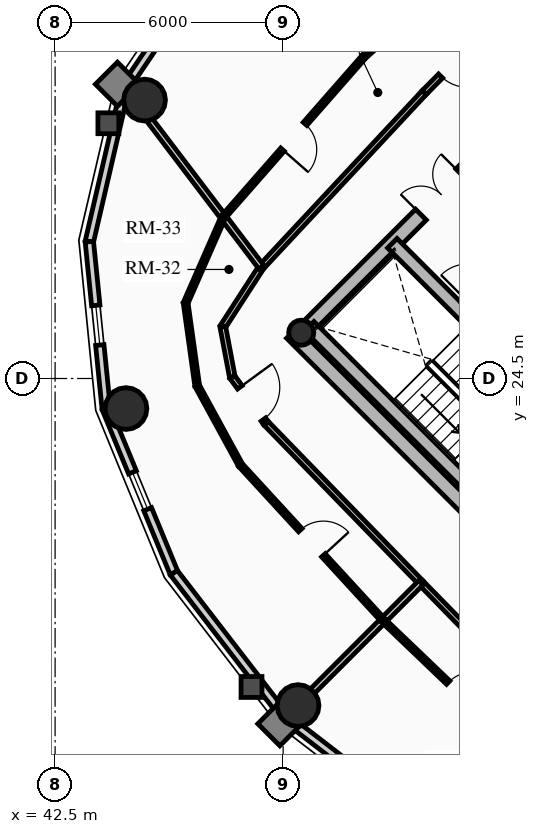
"""IFC4 building model, lengths in metres.
Left out: names, types, materials, properties, quantities, classifications, styles, units other than length and angle.
Written with IfcOpenShell. Run it as: python <this file> out.ifc"""

import sys

from ifc_helpers import new_model, si_unit, direction, frame, frame_2d, origin, origin_2d, place, context, subcontext, project, spatial, rectangle, circle, hollow_circle, extrude, source, transform, mapped, element, fill, save


model = new_model("IFC4")
c1 = context("Model", 3, precision=1e-05, world=origin(), true_north=direction((0.0, 1.0)))
c2 = subcontext(c1, "Body", "Model", "MODEL_VIEW")
j1 = project(units=[si_unit("LENGTHUNIT", "METRE"), si_unit("PLANEANGLEUNIT", "RADIAN")], contexts=[c1])
p1 = place(None, origin())
s1 = spatial("IfcSite", under=j1, at=p1, CompositionType="ELEMENT")
p2 = place(p1, origin())
s2 = spatial("IfcBuilding", under=s1, at=p2, CompositionType="ELEMENT")
p3 = place(p2, frame((0.0, 0.0, 226.05)))
s3 = spatial("IfcBuildingStorey", under=s2, at=p3, CompositionType="ELEMENT", Elevation=226.05)
p4 = place(p3, frame((58.702, 15.732, 0.0), z_axis=(0.0, 0.0, 1.0), x_axis=(-0.707106781187, 0.707106781187, 0.0)))
e1 = element("IfcWall", 1, at=p4, inside=s3, PredefinedType="SHEAR", context=c2, shape_type="SweptSolid", body=[
    extrude(rectangle(XDim=14.1, YDim=0.4, at=frame_2d((7.05, 0.0))), origin(), (0.0, 0.0, 1.0), 3.2),
])
p5 = place(p3, frame((48.873, 25.561, 0.0), z_axis=(0.0, 0.0, 1.0), x_axis=(0.707106781187, 0.707106781187, 0.0)))
e2 = element("IfcWall", 2, at=p5, inside=s3, PredefinedType="SHEAR", context=c2, shape_type="SweptSolid", body=[
    extrude(rectangle(XDim=10.7, YDim=0.4, at=frame_2d((5.35, 0.0))), origin(), (0.0, 0.0, 1.0), 3.2),
])
m1 = source(origin(), c2, "Body", "SweptSolid", [
    extrude(rectangle(XDim=1.5, YDim=2.02, at=frame_2d((0.75, 1.01))), frame((0.0, 0.21, 0.0), z_axis=(0.0, -1.0, 0.0), x_axis=(1.0, 0.0, 0.0)), (0.0, 0.0, 1.0), 0.42),
])
p6 = place(p5, frame((4.6, 0.0, 0.0)))
e3 = element("IfcOpeningElement", 3, at=p6, cuts=e2, PredefinedType="OPENING", context=c2, shape_type="MappedRepresentation", body=[
    mapped(m1, transform((0.0, 0.0, 0.0), x_axis=(1.0, 0.0, 0.0), y_axis=(0.0, 1.0, 0.0), z_axis=(0.0, 0.0, 1.0), scale=1.0)),
])
p7 = place(p3, frame((61.06, 18.373, 0.0), z_axis=(0.0, 0.0, 1.0), x_axis=(-0.707106781187, 0.707106781187, 0.0)))
e4 = element("IfcWall", 4, at=p7, inside=s3, PredefinedType="SHEAR", context=c2, shape_type="SweptSolid", body=[
    extrude(rectangle(XDim=13.7, YDim=0.35, at=frame_2d((6.85, 0.0))), origin(), (0.0, 0.0, 1.0), 3.2),
])
m2 = source(origin(), c2, "Body", "SweptSolid", [
    extrude(rectangle(XDim=1.1, YDim=2.015, at=frame_2d((0.55, 1.007))), frame((0.0, 0.185, 0.0), z_axis=(0.0, -1.0, 0.0), x_axis=(1.0, 0.0, 0.0)), (0.0, 0.0, 1.0), 0.37),
])
p8 = place(p7, frame((4.85, 0.0, 0.0)))
e5 = element("IfcOpeningElement", 5, at=p8, cuts=e4, PredefinedType="OPENING", context=c2, shape_type="MappedRepresentation", body=[
    mapped(m2, transform((0.0, 0.0, 0.0), x_axis=(1.0, 0.0, 0.0), y_axis=(0.0, 1.0, 0.0), z_axis=(0.0, 0.0, 1.0), scale=1.0)),
])
p9 = place(p7, frame((0.625, 0.0, 0.0)))
e6 = element("IfcOpeningElement", 6, at=p9, cuts=e4, PredefinedType="OPENING", context=c2, shape_type="MappedRepresentation", body=[
    mapped(m2, transform((0.0, 0.0, 0.0), x_axis=(1.0, 0.0, 0.0), y_axis=(0.0, 1.0, 0.0), z_axis=(0.0, 0.0, 1.0), scale=1.0)),
])
p10 = place(p7, frame((2.625, 0.0, 0.0)))
e7 = element("IfcOpeningElement", 7, at=p10, cuts=e4, PredefinedType="OPENING", context=c2, shape_type="MappedRepresentation", body=[
    mapped(m2, transform((0.0, 0.0, 0.0), x_axis=(1.0, 0.0, 0.0), y_axis=(0.0, 1.0, 0.0), z_axis=(0.0, 0.0, 1.0), scale=1.0)),
])
m3 = source(origin(), c2, "Body", "SweptSolid", [
    extrude(rectangle(XDim=1.15, YDim=2.02, at=frame_2d((0.575, 1.01))), frame((0.0, 0.185, 0.0), z_axis=(0.0, -1.0, 0.0), x_axis=(1.0, 0.0, 0.0)), (0.0, 0.0, 1.0), 0.37),
])
p11 = place(p7, frame((7.27, 0.0, 0.0)))
e8 = element("IfcOpeningElement", 8, at=p11, cuts=e4, PredefinedType="OPENING", context=c2, shape_type="MappedRepresentation", body=[
    mapped(m3, transform((0.0, 0.0, 0.0), x_axis=(1.0, 0.0, 0.0), y_axis=(0.0, 1.0, 0.0), z_axis=(0.0, 0.0, 1.0), scale=1.0)),
])
p12 = place(p3, frame((53.922, 21.141, 0.0), z_axis=(0.0, 0.0, 1.0), x_axis=(-0.707106781187, 0.707106781187, 0.0)))
e9 = element("IfcWall", 9, at=p12, inside=s3, PredefinedType="SHEAR", context=c2, shape_type="SweptSolid", body=[
    extrude(rectangle(XDim=6.695, YDim=0.35, at=frame_2d((3.348, 0.0))), origin(), (0.0, 0.0, 1.0), 3.2),
])
p13 = place(p3, frame((48.976, 25.706, 0.0), z_axis=(0.0, 0.0, 1.0), x_axis=(0.707106781187, 0.707106781187, 0.0)))
e10 = element("IfcColumn", 10, at=p13, inside=s3, PredefinedType="COLUMN", context=c2, shape_type="SweptSolid", body=[
    extrude(hollow_circle(Radius=0.33, WallThickness=0.025, at=origin_2d()), origin(), (0.0, 0.0, 1.0), 3.2),
])
for number, where, z_axis, x_axis in (
    (11, (44.854, 31.827, 0.0), (0.0, 0.0, 1.0), (1.0, 0.0, 0.0)),
    (12, (44.365, 23.709, 0.0), (0.0, 0.0, 1.0), (1.0, 0.0, 0.0)),
    (13, (48.893, 15.893, 0.0), (0.0, 0.0, 1.0), (1.0, 0.0, 0.0)),
):
    element("IfcColumn", number, at=place(p3, frame(where, z_axis=z_axis, x_axis=x_axis)), inside=s3, PredefinedType="USERDEFINED", context=c2, shape_type="SweptSolid", body=[
        extrude(circle(Radius=0.55, at=origin_2d()), origin(), (0.0, 0.0, 1.0), 3.2),
    ])
p14 = place(p3, frame((44.337, 32.144, 0.0), z_axis=(0.0, 0.0, 1.0), x_axis=(0.559495003079, 0.828833723692, 0.0)))
e14 = element("IfcWall", 14, at=p14, inside=s3, PredefinedType="SOLIDWALL", context=c2, shape_type="SweptSolid", body=[
    extrude(rectangle(XDim=3.976, YDim=0.22, at=frame_2d((1.988, 0.0))), origin(), (0.0, 0.0, 1.0), 2.612),
])
m4 = source(origin(), c2, "Body", "SweptSolid", [
    extrude(rectangle(XDim=1.05, YDim=1.3, at=frame_2d((0.525, 0.65))), frame((0.0, 0.12, 0.0), z_axis=(0.0, -1.0, 0.0), x_axis=(1.0, 0.0, 0.0)), (0.0, 0.0, 1.0), 0.24),
])
p15 = place(p14, frame((1.463, 0.0, 0.65)))
e15 = element("IfcOpeningElement", 15, at=p15, cuts=e14, PredefinedType="OPENING", context=c2, shape_type="MappedRepresentation", body=[
    mapped(m4, transform((0.0, 0.0, 0.0), x_axis=(1.0, 0.0, 0.0), y_axis=(0.0, 1.0, 0.0), z_axis=(0.0, 0.0, 1.0), scale=1.0)),
])
p16 = place(p3, frame((43.401, 28.1, 0.0), z_axis=(0.0, 0.0, 1.0), x_axis=(0.225473813158, 0.974249228678, 0.0)))
e16 = element("IfcWall", 16, at=p16, inside=s3, PredefinedType="SOLIDWALL", context=c2, shape_type="SweptSolid", body=[
    extrude(rectangle(XDim=4.15, YDim=0.22, at=frame_2d((2.075, 0.0))), origin(), (0.0, 0.0, 1.0), 2.612),
])
p17 = place(p3, frame((43.845, 23.705, 0.0), z_axis=(0.0, 0.0, 1.0), x_axis=(-0.100570534541, 0.994929930991, 0.0)))
e17 = element("IfcWall", 17, at=p17, inside=s3, PredefinedType="SOLIDWALL", context=c2, shape_type="SweptSolid", body=[
    extrude(rectangle(XDim=4.418, YDim=0.22, at=frame_2d((2.209, 0.0))), origin(), (0.0, 0.0, 1.0), 2.612),
])
p18 = place(p17, frame((1.684, 0.0, 0.65)))
e18 = element("IfcOpeningElement", 18, at=p18, cuts=e17, PredefinedType="OPENING", context=c2, shape_type="MappedRepresentation", body=[
    mapped(m4, transform((0.0, 0.0, 0.0), x_axis=(1.0, 0.0, 0.0), y_axis=(0.0, 1.0, 0.0), z_axis=(0.0, 0.0, 1.0), scale=1.0)),
])
p19 = place(p3, frame((45.626, 19.387, 0.0), z_axis=(0.0, 0.0, 1.0), x_axis=(-0.381309704956, 0.924447353237, 0.0)))
e19 = element("IfcWall", 19, at=p19, inside=s3, PredefinedType="SOLIDWALL", context=c2, shape_type="SweptSolid", body=[
    extrude(rectangle(XDim=4.671, YDim=0.22, at=frame_2d((2.335, 0.0))), origin(), (0.0, 0.0, 1.0), 2.612),
])
p20 = place(p19, frame((1.81, 0.0, 0.65)))
e20 = element("IfcOpeningElement", 20, at=p20, cuts=e19, PredefinedType="OPENING", context=c2, shape_type="MappedRepresentation", body=[
    mapped(m4, transform((0.0, 0.0, 0.0), x_axis=(1.0, 0.0, 0.0), y_axis=(0.0, 1.0, 0.0), z_axis=(0.0, 0.0, 1.0), scale=1.0)),
])
p21 = place(p3, frame((48.569, 15.569, 0.0), z_axis=(0.0, 0.0, 1.0), x_axis=(-0.610523083886, 0.791998462147, 0.0)))
e21 = element("IfcWall", 21, at=p21, inside=s3, PredefinedType="SOLIDWALL", context=c2, shape_type="SweptSolid", body=[
    extrude(rectangle(XDim=4.82, YDim=0.22, at=frame_2d((2.41, 0.0))), origin(), (0.0, 0.0, 1.0), 2.612),
])
p22 = place(p3, frame((52.387, 12.626, 0.0), z_axis=(0.0, 0.0, 1.0), x_axis=(-0.791998462147, 0.610523083886, 0.0)))
e22 = element("IfcWall", 22, at=p22, inside=s3, PredefinedType="SOLIDWALL", context=c2, shape_type="SweptSolid", body=[
    extrude(rectangle(XDim=4.82, YDim=0.22, at=frame_2d((2.41, 0.0))), origin(), (0.0, 0.0, 1.0), 2.612),
])
p23 = place(p22, frame((1.885, 0.0, 0.65)))
e23 = element("IfcOpeningElement", 23, at=p23, cuts=e22, PredefinedType="OPENING", context=c2, shape_type="MappedRepresentation", body=[
    mapped(m4, transform((0.0, 0.0, 0.0), x_axis=(1.0, 0.0, 0.0), y_axis=(0.0, 1.0, 0.0), z_axis=(0.0, 0.0, 1.0), scale=1.0)),
])
p24 = place(p3, frame((54.506, 34.344, 0.0), z_axis=(0.0, 0.0, 1.0), x_axis=(-0.703053402247, -0.711137056824, 0.0)))
e24 = element("IfcWall", 24, at=p24, inside=s3, PredefinedType="PARTITIONING", context=c2, shape_type="SweptSolid", body=[
    extrude(rectangle(XDim=3.262, YDim=0.15, at=frame_2d((1.631, 0.0))), origin(), (0.0, 0.0, 1.0), 2.612),
])
m5 = source(origin(), c2, "Body", "SweptSolid", [
    extrude(rectangle(XDim=1.05, YDim=2.015, at=frame_2d((0.525, 1.007))), frame((0.0, 0.085, 0.0), z_axis=(0.0, -1.0, 0.0), x_axis=(1.0, 0.0, 0.0)), (0.0, 0.0, 1.0), 0.17),
])
p25 = place(p24, frame((1.599, 0.0, 0.0)))
e25 = element("IfcOpeningElement", 25, at=p25, cuts=e24, PredefinedType="OPENING", context=c2, shape_type="MappedRepresentation", body=[
    mapped(m5, transform((0.0, 0.0, 0.0), x_axis=(1.0, 0.0, 0.0), y_axis=(0.0, 1.0, 0.0), z_axis=(0.0, 0.0, 1.0), scale=1.0)),
])
p26 = place(p3, frame((52.212, 32.024, 0.0), z_axis=(0.0, 0.0, 1.0), x_axis=(-0.682158998173, -0.731203871169, 0.0)))
e26 = element("IfcWall", 26, at=p26, inside=s3, PredefinedType="PARTITIONING", context=c2, shape_type="SweptSolid", body=[
    extrude(rectangle(XDim=6.282, YDim=0.15, at=frame_2d((3.141, 0.0))), origin(), (0.0, 0.0, 1.0), 2.545),
])
p27 = place(p3, frame((47.927, 27.431, 0.0), z_axis=(0.0, 0.0, 1.0), x_axis=(-0.543126643356, -0.839650790077, 0.0)))
e27 = element("IfcWall", 27, at=p27, inside=s3, PredefinedType="PARTITIONING", context=c2, shape_type="SweptSolid", body=[
    extrude(rectangle(XDim=1.868, YDim=0.15, at=frame_2d((0.934, 0.0))), origin(), (0.0, 0.0, 1.0), 2.545),
])
p28 = place(p3, frame((46.912, 25.862, 0.0), z_axis=(0.0, 0.0, 1.0), x_axis=(0.186095172215, -0.98253172309, 0.0)))
e28 = element("IfcWall", 28, at=p28, inside=s3, PredefinedType="PARTITIONING", context=c2, shape_type="SweptSolid", body=[
    extrude(rectangle(XDim=1.346, YDim=0.15, at=frame_2d((0.673, 0.0))), origin(), (0.0, 0.0, 1.0), 2.612),
])
p29 = place(p3, frame((47.163, 24.54, 0.0), z_axis=(0.0, 0.0, 1.0), x_axis=(0.589711902124, -0.807613690135, 0.0)))
e29 = element("IfcWall", 29, at=p29, inside=s3, PredefinedType="PARTITIONING", context=c2, shape_type="SweptSolid", body=[
    extrude(rectangle(XDim=1.507, YDim=0.15, at=frame_2d((0.753, 0.0))), origin(), (0.0, 0.0, 1.0), 2.545),
])
p30 = place(p29, frame((0.337, 0.0, 0.0)))
e30 = element("IfcOpeningElement", 30, at=p30, cuts=e29, PredefinedType="OPENING", context=c2, shape_type="MappedRepresentation", body=[
    mapped(m5, transform((0.0, 0.0, 0.0), x_axis=(1.0, 0.0, 0.0), y_axis=(0.0, 1.0, 0.0), z_axis=(0.0, 0.0, 1.0), scale=1.0)),
])
p31 = place(p3, frame((48.052, 23.323, 0.0), z_axis=(0.0, 0.0, 1.0), x_axis=(0.696573981306, -0.717484974454, 0.0)))
e31 = element("IfcWall", 31, at=p31, inside=s3, PredefinedType="PARTITIONING", context=c2, shape_type="SweptSolid", body=[
    extrude(rectangle(XDim=5.849, YDim=0.15, at=frame_2d((2.925, 0.0))), origin(), (0.0, 0.0, 1.0), 2.975),
])
p32 = place(p3, frame((52.126, 19.126, 0.0), z_axis=(0.0, 0.0, 1.0), x_axis=(0.698979087027, -0.715142108884, 0.0)))
e32 = element("IfcWall", 32, at=p32, inside=s3, PredefinedType="PARTITIONING", context=c2, shape_type="SweptSolid", body=[
    extrude(rectangle(XDim=5.966, YDim=0.15, at=frame_2d((2.983, 0.0))), origin(), (0.0, 0.0, 1.0), 2.612),
])
p33 = place(p3, frame((47.927, 27.431, 0.0), z_axis=(0.0, 0.0, 1.0), x_axis=(-0.604823333103, 0.796359677366, 0.0)))
e33 = element("IfcWall", 33, at=p33, inside=s3, PredefinedType="PARTITIONING", context=c2, shape_type="SweptSolid", body=[
    extrude(rectangle(XDim=5.907, YDim=0.16, at=frame_2d((2.953, 0.0))), origin(), (0.0, 0.0, 1.0), 2.612),
])
p34 = place(p3, frame((52.126, 19.126, 0.0), z_axis=(0.0, 0.0, 1.0), x_axis=(-0.707106781187, -0.707106781187, 0.0)))
e34 = element("IfcWall", 34, at=p34, inside=s3, PredefinedType="PARTITIONING", context=c2, shape_type="SweptSolid", body=[
    extrude(rectangle(XDim=5.01, YDim=0.16, at=frame_2d((2.505, 0.0))), origin(), (0.0, 0.0, 1.0), 2.612),
])
p35 = place(p3, frame((53.206, 35.268, 0.0), z_axis=(0.0, 0.0, 1.0), x_axis=(-0.746677760999, -0.665185929819, 0.0)))
e35 = element("IfcWall", 35, at=p35, inside=s3, PredefinedType="PARTITIONING", context=c2, shape_type="SweptSolid", body=[
    extrude(rectangle(XDim=3.445, YDim=0.125, at=frame_2d((1.723, 0.0))), origin(), (0.0, 0.0, 1.0), 2.612),
])
p36 = place(p3, frame((50.634, 32.977, 0.0), z_axis=(0.0, 0.0, 1.0), x_axis=(-0.659241945747, -0.751930885765, 0.0)))
e36 = element("IfcWall", 36, at=p36, inside=s3, PredefinedType="PARTITIONING", context=c2, shape_type="SweptSolid", body=[
    extrude(rectangle(XDim=5.624, YDim=0.125, at=frame_2d((2.812, 0.0))), origin(), (0.0, 0.0, 1.0), 2.545),
])
m6 = source(origin(), c2, "Body", "SweptSolid", [
    extrude(rectangle(XDim=0.9, YDim=2.005, at=frame_2d((0.45, 1.002))), frame((0.0, 0.073, 0.0), z_axis=(0.0, -1.0, 0.0), x_axis=(1.0, 0.0, 0.0)), (0.0, 0.0, 1.0), 0.145),
])
p37 = place(p36, frame((2.362, 0.0, 0.0)))
e37 = element("IfcOpeningElement", 37, at=p37, cuts=e36, PredefinedType="OPENING", context=c2, shape_type="MappedRepresentation", body=[
    mapped(m6, transform((0.0, 0.0, 0.0), x_axis=(1.0, 0.0, 0.0), y_axis=(0.0, 1.0, 0.0), z_axis=(0.0, 0.0, 1.0), scale=1.0)),
])
p38 = place(p3, frame((46.927, 28.748, 0.0), z_axis=(0.0, 0.0, 1.0), x_axis=(-0.401820136661, -0.91571861277, 0.0)))
e38 = element("IfcWall", 38, at=p38, inside=s3, PredefinedType="PARTITIONING", context=c2, shape_type="SweptSolid", body=[
    extrude(rectangle(XDim=2.468, YDim=0.125, at=frame_2d((1.234, 0.0))), origin(), (0.0, 0.0, 1.0), 2.545),
])
p39 = place(p3, frame((45.935, 26.488, 0.0), z_axis=(0.0, 0.0, 1.0), x_axis=(0.138347758345, -0.990383712387, 0.0)))
e39 = element("IfcWall", 39, at=p39, inside=s3, PredefinedType="PARTITIONING", context=c2, shape_type="SweptSolid", body=[
    extrude(rectangle(XDim=2.202, YDim=0.125, at=frame_2d((1.101, 0.0))), origin(), (0.0, 0.0, 1.0), 2.612),
])
p40 = place(p3, frame((46.24, 24.307, 0.0), z_axis=(0.0, 0.0, 1.0), x_axis=(0.479212341296, -0.87769899849, 0.0)))
e40 = element("IfcWall", 40, at=p40, inside=s3, PredefinedType="PARTITIONING", context=c2, shape_type="SweptSolid", body=[
    extrude(rectangle(XDim=2.374, YDim=0.125, at=frame_2d((1.187, 0.0))), origin(), (0.0, 0.0, 1.0), 2.545),
])
p41 = place(p3, frame((47.377, 22.223, 0.0), z_axis=(0.0, 0.0, 1.0), x_axis=(0.676554417653, -0.736392639802, 0.0)))
e41 = element("IfcWall", 41, at=p41, inside=s3, PredefinedType="PARTITIONING", context=c2, shape_type="SweptSolid", body=[
    extrude(rectangle(XDim=5.553, YDim=0.125, at=frame_2d((2.776, 0.0))), origin(), (0.0, 0.0, 1.0), 2.975),
])
p42 = place(p41, frame((2.326, 0.0, 0.0)))
e42 = element("IfcOpeningElement", 42, at=p42, cuts=e41, PredefinedType="OPENING", context=c2, shape_type="MappedRepresentation", body=[
    mapped(m6, transform((0.0, 0.0, 0.0), x_axis=(1.0, 0.0, 0.0), y_axis=(0.0, 1.0, 0.0), z_axis=(0.0, 0.0, 1.0), scale=1.0)),
])
p43 = place(p3, frame((51.134, 18.134, 0.0), z_axis=(0.0, 0.0, 1.0), x_axis=(0.722450775654, -0.691422357721, 0.0)))
e43 = element("IfcWall", 43, at=p43, inside=s3, PredefinedType="PARTITIONING", context=c2, shape_type="SweptSolid", body=[
    extrude(rectangle(XDim=5.634, YDim=0.125, at=frame_2d((2.817, 0.0))), origin(), (0.0, 0.0, 1.0), 2.612),
])
p44 = place(p43, frame((2.367, 0.0, 0.0)))
e44 = element("IfcOpeningElement", 44, at=p44, cuts=e43, PredefinedType="OPENING", context=c2, shape_type="MappedRepresentation", body=[
    mapped(m6, transform((0.0, 0.0, 0.0), x_axis=(1.0, 0.0, 0.0), y_axis=(0.0, 1.0, 0.0), z_axis=(0.0, 0.0, 1.0), scale=1.0)),
])
m7 = source(origin(), c2, "Body", "SweptSolid", [
    extrude(rectangle(XDim=1.05, YDim=1.3, at=frame_2d((0.525, 0.65))), frame((0.0, 0.03, 0.0), z_axis=(0.0, -1.0, 0.0), x_axis=(1.0, 0.0, 0.0)), (0.0, 0.0, 1.0), 0.06),
])
p45 = place(p18, origin())
e45 = element("IfcWindow", 45, at=p45, inside=s3, PartitioningType="SINGLE_PANEL", PredefinedType="WINDOW", context=c2, shape_type="MappedRepresentation", body=[
    mapped(m7, transform((0.0, 0.0, 0.0), x_axis=(1.0, 0.0, 0.0), y_axis=(0.0, 1.0, 0.0), z_axis=(0.0, 0.0, 1.0), scale=1.0)),
])
fill(e18, e45)
p46 = place(p20, origin())
e46 = element("IfcWindow", 46, at=p46, inside=s3, PartitioningType="SINGLE_PANEL", PredefinedType="WINDOW", context=c2, shape_type="MappedRepresentation", body=[
    mapped(m7, transform((0.0, 0.0, 0.0), x_axis=(1.0, 0.0, 0.0), y_axis=(0.0, 1.0, 0.0), z_axis=(0.0, 0.0, 1.0), scale=1.0)),
])
fill(e20, e46)
m8 = source(origin(), c2, "Body", "SweptSolid", [
    extrude(rectangle(XDim=1.5, YDim=2.02, at=frame_2d((0.75, 1.01))), frame((0.0, 0.025, 0.0), z_axis=(0.0, -1.0, 0.0), x_axis=(1.0, 0.0, 0.0)), (0.0, 0.0, 1.0), 0.05),
])
p47 = place(p6, origin())
e47 = element("IfcDoor", 47, at=p47, inside=s3, OperationType="DOUBLE_DOOR_SINGLE_SWING", PredefinedType="DOOR", context=c2, shape_type="MappedRepresentation", body=[
    mapped(m8, transform((0.0, 0.0, 0.0), x_axis=(1.0, 0.0, 0.0), y_axis=(0.0, 1.0, 0.0), z_axis=(0.0, 0.0, 1.0), scale=1.0)),
])
fill(e3, e47)
m9 = source(origin(), c2, "Body", "SweptSolid", [
    extrude(rectangle(XDim=1.05, YDim=2.015, at=frame_2d((0.525, 1.007))), frame((0.0, 0.025, 0.0), z_axis=(0.0, -1.0, 0.0), x_axis=(1.0, 0.0, 0.0)), (0.0, 0.0, 1.0), 0.05),
])
p48 = place(p25, origin())
e48 = element("IfcDoor", 48, at=p48, inside=s3, OperationType="SINGLE_SWING_LEFT", PredefinedType="DOOR", context=c2, shape_type="MappedRepresentation", body=[
    mapped(m9, transform((0.0, 0.0, 0.0), x_axis=(1.0, 0.0, 0.0), y_axis=(0.0, 1.0, 0.0), z_axis=(0.0, 0.0, 1.0), scale=1.0)),
])
fill(e25, e48)
m10 = source(origin(), c2, "Body", "SweptSolid", [
    extrude(rectangle(XDim=0.9, YDim=2.005, at=frame_2d((0.45, 1.002))), frame((0.0, 0.025, 0.0), z_axis=(0.0, -1.0, 0.0), x_axis=(1.0, 0.0, 0.0)), (0.0, 0.0, 1.0), 0.05),
])
p49 = place(p37, origin())
e49 = element("IfcDoor", 49, at=p49, inside=s3, OperationType="SINGLE_SWING_RIGHT", PredefinedType="DOOR", context=c2, shape_type="MappedRepresentation", body=[
    mapped(m10, transform((0.0, 0.0, 0.0), x_axis=(1.0, 0.0, 0.0), y_axis=(0.0, 1.0, 0.0), z_axis=(0.0, 0.0, 1.0), scale=1.0)),
])
fill(e37, e49)
p50 = place(p30, origin())
e50 = element("IfcDoor", 50, at=p50, inside=s3, OperationType="SINGLE_SWING_LEFT", PredefinedType="DOOR", context=c2, shape_type="MappedRepresentation", body=[
    mapped(m9, transform((0.0, 0.0, 0.0), x_axis=(1.0, 0.0, 0.0), y_axis=(0.0, 1.0, 0.0), z_axis=(0.0, 0.0, 1.0), scale=1.0)),
])
fill(e30, e50)
p51 = place(p42, origin())
e51 = element("IfcDoor", 51, at=p51, inside=s3, OperationType="SINGLE_SWING_RIGHT", PredefinedType="DOOR", context=c2, shape_type="MappedRepresentation", body=[
    mapped(m10, transform((0.0, 0.0, 0.0), x_axis=(1.0, 0.0, 0.0), y_axis=(0.0, 1.0, 0.0), z_axis=(0.0, 0.0, 1.0), scale=1.0)),
])
fill(e42, e51)
p52 = place(p44, origin())
e52 = element("IfcDoor", 52, at=p52, inside=s3, OperationType="SINGLE_SWING_RIGHT", PredefinedType="DOOR", context=c2, shape_type="MappedRepresentation", body=[
    mapped(m10, transform((0.0, 0.0, 0.0), x_axis=(1.0, 0.0, 0.0), y_axis=(0.0, 1.0, 0.0), z_axis=(0.0, 0.0, 1.0), scale=1.0)),
])
fill(e44, e52)
save(model, sys.argv[1])
